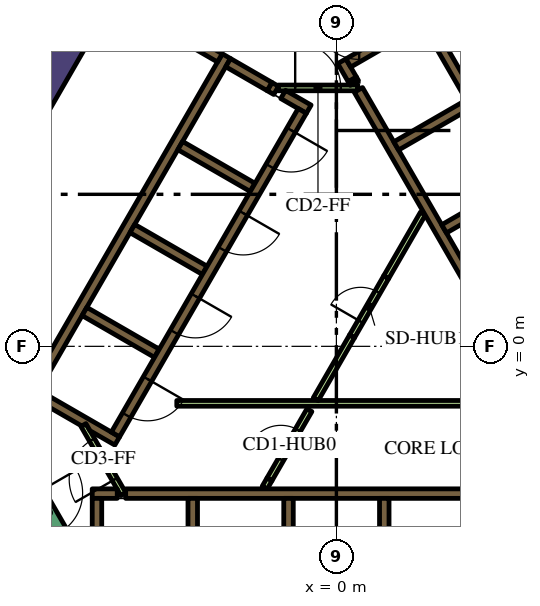
"""IFC4 building model, lengths in metres.
Left out: names, types, materials, properties, quantities, classifications, styles, units other than length and angle.
Written with IfcOpenShell. Run it as: python <this file> out.ifc"""

import sys

from ifc_helpers import new_model, si_unit, direction, frame, frame_2d, origin, place, context, subcontext, project, spatial, polyline, rectangle, outline, extrude, element, fill, save


model = new_model("IFC4")
c1 = context("Model", 3, precision=1e-05, world=origin(), true_north=direction((0.0, 1.0)))
c2 = subcontext(c1, "Body", "Model", "MODEL_VIEW")
j1 = project(units=[si_unit("LENGTHUNIT", "METRE"), si_unit("PLANEANGLEUNIT", "RADIAN")], contexts=[c1])
p1 = place(None, origin())
s1 = spatial("IfcSite", under=j1, at=p1, CompositionType="ELEMENT")
p2 = place(p1, origin())
s2 = spatial("IfcBuilding", under=s1, at=p2, CompositionType="ELEMENT")
p3 = place(p2, frame((0.0, 0.0, 171.0)))
s3 = spatial("IfcBuildingStorey", under=s2, at=p3, CompositionType="ELEMENT", Elevation=171.0)
p4 = place(p3, frame((8.279, 5.761, 0.0), z_axis=(0.0, 0.0, 1.0), x_axis=(-0.500010359015, 0.866019422922, 0.0)))
e1 = element("IfcWall", 1, at=p4, inside=s3, PredefinedType="SOLIDWALL", context=c2, shape_type="SweptSolid", body=[
    extrude(rectangle(XDim=12.528, YDim=0.8, at=frame_2d((6.264, 0.0))), origin(), (0.0, 0.0, 1.0), 4.2),
])
p5 = place(p3, frame((-12.668, -1.842, 0.0), z_axis=(0.0, 0.0, 1.0), x_axis=(0.500003640647, 0.866023301845, 0.0)))
e2 = element("IfcWall", 2, at=p5, inside=s3, PredefinedType="SOLIDWALL", context=c2, shape_type="SweptSolid", body=[
    extrude(rectangle(XDim=15.858, YDim=0.8, at=frame_2d((7.929, 0.0))), origin(), (0.0, 0.0, 1.0), 4.2),
])
p6 = place(p3, frame((-5.545, -3.875, 0.0), z_axis=(0.0, 0.0, 1.0), x_axis=(1.0, 0.0, 0.0)))
e3 = element("IfcWall", 3, at=p6, inside=s3, PredefinedType="SOLIDWALL", context=c2, shape_type="SweptSolid", body=[
    extrude(rectangle(XDim=11.97, YDim=0.25, at=frame_2d((5.985, 0.0))), origin(), (0.0, 0.0, 1.0), 4.2),
])
p7 = place(p3, frame((-6.425, -3.875, 0.0), z_axis=(0.0, 0.0, 1.0), x_axis=(1.0, 0.0, 0.0)))
e4 = element("IfcWall", 4, at=p7, inside=s3, PredefinedType="SOLIDWALL", context=c2, shape_type="SweptSolid", body=[
    extrude(rectangle(XDim=0.658, YDim=0.25, at=frame_2d((0.329, 0.0))), origin(), (0.0, 0.0, 1.0), 4.2),
])
for number, where, z_axis, x_axis in (
    (5, (1.26, -4.0, 0.0), (0.0, 0.0, 1.0), (0.0, -1.0, 0.0)),
    (6, (-1.26, -4.0, 0.0), (0.0, 0.0, 1.0), (0.0, -1.0, 0.0)),
    (7, (-3.78, -4.0, 0.0), (0.0, 0.0, 1.0), (0.0, -1.0, 0.0)),
):
    element("IfcWall", number, at=place(p3, frame(where, z_axis=z_axis, x_axis=x_axis)), inside=s3, PredefinedType="SOLIDWALL", context=c2, shape_type="SweptSolid", body=[
        extrude(rectangle(XDim=2.2, YDim=0.25, at=frame_2d((1.1, 0.0))), origin(), (0.0, 0.0, 1.0), 4.2),
    ])
p8 = place(p3, frame((-6.3, -7.125, 0.0), z_axis=(0.0, 0.0, 1.0), x_axis=(0.0, 1.0, 0.0)))
e8 = element("IfcWall", 8, at=p8, inside=s3, PredefinedType="SOLIDWALL", context=c2, shape_type="SweptSolid", body=[
    extrude(rectangle(XDim=3.125, YDim=0.25, at=frame_2d((1.562, 0.0))), origin(), (0.0, 0.0, 1.0), 4.2),
])
p9 = place(p3, frame((0.473, 6.93, 0.0), z_axis=(0.0, 0.0, 1.0), x_axis=(-0.49972245349, 0.866185586049, 0.0)))
e9 = element("IfcWall", 9, at=p9, inside=s3, PredefinedType="SOLIDWALL", context=c2, shape_type="SweptSolid", body=[
    extrude(rectangle(XDim=0.11, YDim=0.25, at=frame_2d((0.055, 0.0))), origin(), (0.0, 0.0, 1.0), 4.2),
])
p10 = place(p3, frame((6.568, -3.627, 0.0), z_axis=(0.0, 0.0, 1.0), x_axis=(-0.499999455981, 0.866025717874, 0.0)))
e10 = element("IfcWall", 10, at=p10, inside=s3, PredefinedType="SOLIDWALL", context=c2, shape_type="SweptSolid", body=[
    extrude(rectangle(XDim=11.978, YDim=0.25, at=frame_2d((5.989, 0.0))), origin(), (0.0, 0.0, 1.0), 4.2),
])
p11 = place(p3, frame((0.417, 7.027, 0.0), z_axis=(0.0, 0.0, 1.0), x_axis=(-0.500210807569, 0.865903659763, 0.0)))
e11 = element("IfcWall", 11, at=p11, inside=s3, PredefinedType="SOLIDWALL", context=c2, shape_type="SweptSolid", body=[
    extrude(rectangle(XDim=0.548, YDim=0.25, at=frame_2d((0.274, 0.0))), origin(), (0.0, 0.0, 1.0), 4.2),
])
p12 = place(p3, frame((3.1, 9.064, 0.0), z_axis=(0.0, 0.0, 1.0), x_axis=(-0.866030133475, -0.499991807846, 0.0)))
e12 = element("IfcWall", 12, at=p12, inside=s3, PredefinedType="SOLIDWALL", context=c2, shape_type="SweptSolid", body=[
    extrude(rectangle(XDim=3.217, YDim=0.25, at=frame_2d((1.608, 0.0))), origin(), (0.0, 0.0, 1.0), 4.2),
])
p13 = place(p3, frame((1.574, 5.274, 0.0), z_axis=(0.0, 0.0, 1.0), x_axis=(0.866028486751, 0.499994660107, 0.0)))
e13 = element("IfcWall", 13, at=p13, inside=s3, PredefinedType="SOLIDWALL", context=c2, shape_type="SweptSolid", body=[
    extrude(rectangle(XDim=2.2, YDim=0.25, at=frame_2d((1.1, 0.0))), origin(), (0.0, 0.0, 1.0), 4.2),
])
p14 = place(p3, frame((2.834, 3.091, 0.0), z_axis=(0.0, 0.0, 1.0), x_axis=(0.866008176907, 0.50002983664, 0.0)))
e14 = element("IfcWall", 14, at=p14, inside=s3, PredefinedType="SOLIDWALL", context=c2, shape_type="SweptSolid", body=[
    extrude(rectangle(XDim=2.2, YDim=0.25, at=frame_2d((1.1, 0.0))), origin(), (0.0, 0.0, 1.0), 4.2),
])
p15 = place(p3, frame((-8.06, -1.311, 0.0), z_axis=(0.0, 0.0, 1.0), x_axis=(0.50000273126, 0.866023826885, 0.0)))
e15 = element("IfcWall", 15, at=p15, inside=s3, PredefinedType="SOLIDWALL", context=c2, shape_type="SweptSolid", body=[
    extrude(rectangle(XDim=10.33, YDim=0.25, at=frame_2d((5.165, 0.0))), origin(), (0.0, 0.0, 1.0), 4.2),
])
p16 = place(p3, frame((-1.758, 6.835, 0.0), z_axis=(0.0, 0.0, 1.0), x_axis=(0.865982457891, -0.500074377092, 0.0)))
e16 = element("IfcWall", 16, at=p16, inside=s3, PredefinedType="SOLIDWALL", context=c2, shape_type="SweptSolid", body=[
    extrude(rectangle(XDim=0.2, YDim=0.25, at=frame_2d((0.1, 0.0))), origin(), (0.0, 0.0, 1.0), 4.2),
])
p17 = place(p3, frame((-1.76, 6.836, 0.0), z_axis=(0.0, 0.0, 1.0), x_axis=(-0.865952863304, 0.500125622755, 0.0)))
e17 = element("IfcWall", 17, at=p17, inside=s3, PredefinedType="SOLIDWALL", context=c2, shape_type="SweptSolid", body=[
    extrude(rectangle(XDim=1.258, YDim=0.25, at=frame_2d((0.629, 0.0))), origin(), (0.0, 0.0, 1.0), 4.2),
])
p18 = place(p3, frame((-0.728, 6.24, 0.0), z_axis=(0.0, 0.0, 1.0), x_axis=(-0.865955664968, 0.500120771724, 0.0)))
e18 = element("IfcWall", 18, at=p18, inside=s3, PredefinedType="SOLIDWALL", context=c2, shape_type="SweptSolid", body=[
    extrude(rectangle(XDim=0.778, YDim=0.25, at=frame_2d((0.389, 0.0))), origin(), (0.0, 0.0, 1.0), 4.2),
])
for number, where, z_axis, x_axis in (
    (19, (-2.204, 4.182, 0.0), (0.0, 0.0, 1.0), (-0.866, 0.5, 0.0)),
    (20, (-5.369, 3.1, 0.0), (0.0, 0.0, 1.0), (0.866, -0.5, 0.0)),
    (21, (-4.724, -0.182, 0.0), (0.0, 0.0, 1.0), (-0.866, 0.5, 0.0)),
):
    element("IfcWall", number, at=place(p3, frame(where, z_axis=z_axis, x_axis=x_axis)), inside=s3, PredefinedType="SOLIDWALL", context=c2, shape_type="SweptSolid", body=[
        extrude(rectangle(XDim=2.2, YDim=0.25, at=frame_2d((1.1, 0.0))), origin(), (0.0, 0.0, 1.0), 4.2),
    ])
p19 = place(p3, origin())
e22 = element("IfcWall", 22, at=p19, inside=s3, PredefinedType="SOLIDWALL", context=c2, shape_type="SweptSolid", body=[
    extrude(outline(polyline([(-5.922, -2.257), (-5.922, -2.257), (-5.705, -2.382), (-5.83, -2.598), (-6.483, -2.221), (-6.591, -2.033), (-6.591, -2.033), (-6.7, -2.096), (-7.952, -1.373), (-7.827, -1.156), (-5.922, -2.257)])), origin(), (0.0, 0.0, 1.0), 4.2),
])
p20 = place(p3, frame((-3.066, 7.59, 0.0), z_axis=(0.0, 0.0, 1.0), x_axis=(-0.866081358704, 0.49990307071, 0.0)))
e23 = element("IfcWall", 23, at=p20, inside=s3, PredefinedType="SOLIDWALL", context=c2, shape_type="SweptSolid", body=[
    extrude(rectangle(XDim=0.858, YDim=0.25, at=frame_2d((0.429, 0.0))), origin(), (0.0, 0.0, 1.0), 4.2),
])
p21 = place(p3, frame((-4.2, -1.5, 0.0), z_axis=(0.0, 0.0, 1.0), x_axis=(1.0, 0.0, 0.0)))
e24 = element("IfcWall", 24, at=p21, inside=s3, PredefinedType="PARTITIONING", context=c2, shape_type="SweptSolid", body=[
    extrude(rectangle(XDim=9.359, YDim=0.15, at=frame_2d((4.68, 0.0))), origin(), (0.0, 0.0, 1.0), 3.15),
])
p22 = place(p3, frame((-0.544, -1.393, 0.0), z_axis=(0.0, 0.0, 1.0), x_axis=(0.499928740635, 0.866066541489, 0.0)))
e25 = element("IfcWall", 25, at=p22, inside=s3, PredefinedType="PARTITIONING", context=c2, shape_type="SweptSolid", body=[
    extrude(rectangle(XDim=1.912, YDim=0.15, at=frame_2d((0.956, 0.0))), origin(), (0.0, 0.0, 1.0), 3.15),
])
p23 = place(p3, frame((1.312, 1.822, 0.0), z_axis=(0.0, 0.0, 1.0), x_axis=(0.500003549559, 0.866023354436, 0.0)))
e26 = element("IfcWall", 26, at=p23, inside=s3, PredefinedType="PARTITIONING", context=c2, shape_type="SweptSolid", body=[
    extrude(rectangle(XDim=1.93, YDim=0.15, at=frame_2d((0.965, 0.0))), origin(), (0.0, 0.0, 1.0), 3.15),
])
p24 = place(p3, frame((-1.887, -3.718, 0.0), z_axis=(0.0, 0.0, 1.0), x_axis=(0.500165633897, 0.865929753888, 0.0)))
e27 = element("IfcWall", 27, at=p24, inside=s3, PredefinedType="PARTITIONING", context=c2, shape_type="SweptSolid", body=[
    extrude(rectangle(XDim=0.254, YDim=0.15, at=frame_2d((0.127, 0.0))), origin(), (0.0, 0.0, 1.0), 3.15),
])
p25 = place(p3, frame((8.565, -2.185, 0.0), z_axis=(0.0, 0.0, 1.0), x_axis=(-0.499997954832, 0.866026584559, 0.0)))
e28 = element("IfcWall", 28, at=p25, inside=s3, PredefinedType="SOLIDWALL", context=c2, shape_type="SweptSolid", body=[
    extrude(rectangle(XDim=12.35, YDim=0.25, at=frame_2d((6.175, 0.0))), origin(), (0.0, 0.0, 1.0), 4.2),
])
p26 = place(p25, frame((0.585, 0.0, 0.0)))
e29 = element("IfcOpeningElement", 29, at=p26, cuts=e28, PredefinedType="OPENING", context=c2, shape_type="SweptSolid", body=[
    extrude(rectangle(XDim=1.1, YDim=2.1, at=frame_2d((0.55, 1.05))), frame((0.0, 0.135, 0.0), z_axis=(0.0, -1.0, 0.0), x_axis=(1.0, 0.0, 0.0)), (0.0, 0.0, 1.0), 0.27),
])
p27 = place(p3, frame((-0.898, 6.194, 0.0), z_axis=(0.0, 0.0, 1.0), x_axis=(-0.499996202215, -0.866027596426, 0.0)))
e30 = element("IfcWall", 30, at=p27, inside=s3, PredefinedType="SOLIDWALL", context=c2, shape_type="SweptSolid", body=[
    extrude(rectangle(XDim=9.83, YDim=0.25, at=frame_2d((4.915, 0.0))), origin(), (0.0, 0.0, 1.0), 4.2),
])
p28 = place(p27, frame((0.585, 0.0, 0.0)))
e31 = element("IfcOpeningElement", 31, at=p28, cuts=e30, PredefinedType="OPENING", context=c2, shape_type="SweptSolid", body=[
    extrude(rectangle(XDim=1.1, YDim=2.1, at=frame_2d((0.55, 1.05))), frame((0.0, 0.135, 0.0), z_axis=(0.0, -1.0, 0.0), x_axis=(1.0, 0.0, 0.0)), (0.0, 0.0, 1.0), 0.27),
])
p29 = place(p27, frame((3.105, 0.0, 0.0)))
e32 = element("IfcOpeningElement", 32, at=p29, cuts=e30, PredefinedType="OPENING", context=c2, shape_type="SweptSolid", body=[
    extrude(rectangle(XDim=1.1, YDim=2.1, at=frame_2d((0.55, 1.05))), frame((0.0, 0.135, 0.0), z_axis=(0.0, -1.0, 0.0), x_axis=(1.0, 0.0, 0.0)), (0.0, 0.0, 1.0), 0.27),
])
p30 = place(p27, frame((5.625, 0.0, 0.0)))
e33 = element("IfcOpeningElement", 33, at=p30, cuts=e30, PredefinedType="OPENING", context=c2, shape_type="SweptSolid", body=[
    extrude(rectangle(XDim=1.1, YDim=2.1, at=frame_2d((0.55, 1.05))), frame((0.0, 0.135, 0.0), z_axis=(0.0, -1.0, 0.0), x_axis=(1.0, 0.0, 0.0)), (0.0, 0.0, 1.0), 0.27),
])
p31 = place(p27, frame((8.145, 0.0, 0.0)))
e34 = element("IfcOpeningElement", 34, at=p31, cuts=e30, PredefinedType="OPENING", context=c2, shape_type="SweptSolid", body=[
    extrude(rectangle(XDim=1.1, YDim=2.1, at=frame_2d((0.55, 1.05))), frame((0.0, 0.135, 0.0), z_axis=(0.0, -1.0, 0.0), x_axis=(1.0, 0.0, 0.0)), (0.0, 0.0, 1.0), 0.27),
])
p32 = place(p3, frame((-8.103, -3.466, 0.0), z_axis=(0.0, 0.0, 1.0), x_axis=(0.500078061341, -0.865980330357, 0.0)))
e35 = element("IfcWall", 35, at=p32, inside=s3, PredefinedType="SOLIDWALL", context=c2, shape_type="SweptSolid", body=[
    extrude(rectangle(XDim=2.1, YDim=0.4, at=frame_2d((1.05, 0.0))), origin(), (0.0, 0.0, 1.0), 4.2),
])
p33 = place(p32, frame((0.45, 0.0, 0.0)))
e36 = element("IfcOpeningElement", 36, at=p33, cuts=e35, PredefinedType="OPENING", context=c2, shape_type="SweptSolid", body=[
    extrude(rectangle(XDim=1.2, YDim=2.1, at=frame_2d((0.6, 1.05))), frame((0.0, 0.21, 0.0), z_axis=(0.0, -1.0, 0.0), x_axis=(1.0, 0.0, 0.0)), (0.0, 0.0, 1.0), 0.42),
])
p34 = place(p3, frame((-1.76, -3.498, 0.0), z_axis=(0.0, 0.0, 1.0), x_axis=(0.499977374825, 0.866038466041, 0.0)))
e37 = element("IfcWall", 37, at=p34, inside=s3, PredefinedType="PARTITIONING", context=c2, shape_type="SweptSolid", body=[
    extrude(rectangle(XDim=2.1, YDim=0.15, at=frame_2d((1.05, 0.0))), origin(), (0.0, 0.0, 1.0), 3.15),
])
p35 = place(p34, frame((0.6, 0.0, 0.0)))
e38 = element("IfcOpeningElement", 38, at=p35, cuts=e37, PredefinedType="OPENING", context=c2, shape_type="SweptSolid", body=[
    extrude(rectangle(XDim=0.9, YDim=2.1, at=frame_2d((0.45, 1.05))), frame((0.0, 0.085, 0.0), z_axis=(0.0, -1.0, 0.0), x_axis=(1.0, 0.0, 0.0)), (0.0, 0.0, 1.0), 0.17),
])
p36 = place(p3, frame((-1.534, 6.8, 0.0), z_axis=(0.0, 0.0, 1.0), x_axis=(1.0, 0.0, 0.0)))
e39 = element("IfcWall", 39, at=p36, inside=s3, PredefinedType="PARTITIONING", context=c2, shape_type="SweptSolid", body=[
    extrude(rectangle(XDim=2.1, YDim=0.15, at=frame_2d((1.05, 0.0))), origin(), (0.0, 0.0, 1.0), 3.15),
])
p37 = place(p36, frame((0.45, 0.0, 0.0)))
e40 = element("IfcOpeningElement", 40, at=p37, cuts=e39, PredefinedType="OPENING", context=c2, shape_type="SweptSolid", body=[
    extrude(rectangle(XDim=1.2, YDim=2.1, at=frame_2d((0.6, 1.05))), frame((0.0, 0.085, 0.0), z_axis=(0.0, -1.0, 0.0), x_axis=(1.0, 0.0, 0.0)), (0.0, 0.0, 1.0), 0.17),
])
p38 = place(p3, frame((-5.606, -3.89, 0.0), z_axis=(0.0, 0.0, 1.0), x_axis=(-0.500027713859, 0.866009402589, 0.0)))
e41 = element("IfcWall", 41, at=p38, inside=s3, PredefinedType="PARTITIONING", context=c2, shape_type="SweptSolid", body=[
    extrude(rectangle(XDim=2.1, YDim=0.15, at=frame_2d((1.05, 0.0))), origin(), (0.0, 0.0, 1.0), 3.15),
])
p39 = place(p38, frame((0.45, 0.0, 0.0)))
e42 = element("IfcOpeningElement", 42, at=p39, cuts=e41, PredefinedType="OPENING", context=c2, shape_type="SweptSolid", body=[
    extrude(rectangle(XDim=1.2, YDim=2.1, at=frame_2d((0.6, 1.05))), frame((0.0, 0.085, 0.0), z_axis=(0.0, -1.0, 0.0), x_axis=(1.0, 0.0, 0.0)), (0.0, 0.0, 1.0), 0.17),
])
p40 = place(p3, frame((0.412, 0.263, 0.0), z_axis=(0.0, 0.0, 1.0), x_axis=(0.500062916607, 0.865989075817, 0.0)))
e43 = element("IfcWall", 43, at=p40, inside=s3, PredefinedType="PARTITIONING", context=c2, shape_type="SweptSolid", body=[
    extrude(rectangle(XDim=1.8, YDim=0.15, at=frame_2d((0.9, 0.0))), origin(), (0.0, 0.0, 1.0), 3.15),
])
p41 = place(p40, frame((0.45, 0.0, 0.0)))
e44 = element("IfcOpeningElement", 44, at=p41, cuts=e43, PredefinedType="OPENING", context=c2, shape_type="SweptSolid", body=[
    extrude(rectangle(XDim=0.9, YDim=2.1, at=frame_2d((0.45, 1.05))), frame((0.0, 0.085, 0.0), z_axis=(0.0, -1.0, 0.0), x_axis=(1.0, 0.0, 0.0)), (0.0, 0.0, 1.0), 0.17),
])
p42 = place(p28, origin())
e45 = element("IfcDoor", 45, at=p42, inside=s3, OperationType="DOUBLE_DOOR_SLIDING", PredefinedType="DOOR", context=c2, shape_type="SweptSolid", body=[
    extrude(rectangle(XDim=1.1, YDim=2.1, at=frame_2d((0.55, 1.05))), frame((0.0, 0.025, 0.0), z_axis=(0.0, -1.0, 0.0), x_axis=(1.0, 0.0, 0.0)), (0.0, 0.0, 1.0), 0.05),
])
fill(e31, e45)
p43 = place(p29, origin())
e46 = element("IfcDoor", 46, at=p43, inside=s3, OperationType="DOUBLE_DOOR_SLIDING", PredefinedType="DOOR", context=c2, shape_type="SweptSolid", body=[
    extrude(rectangle(XDim=1.1, YDim=2.1, at=frame_2d((0.55, 1.05))), frame((0.0, 0.025, 0.0), z_axis=(0.0, -1.0, 0.0), x_axis=(1.0, 0.0, 0.0)), (0.0, 0.0, 1.0), 0.05),
])
fill(e32, e46)
p44 = place(p30, origin())
e47 = element("IfcDoor", 47, at=p44, inside=s3, OperationType="DOUBLE_DOOR_SLIDING", PredefinedType="DOOR", context=c2, shape_type="SweptSolid", body=[
    extrude(rectangle(XDim=1.1, YDim=2.1, at=frame_2d((0.55, 1.05))), frame((0.0, 0.025, 0.0), z_axis=(0.0, -1.0, 0.0), x_axis=(1.0, 0.0, 0.0)), (0.0, 0.0, 1.0), 0.05),
])
fill(e33, e47)
p45 = place(p31, origin())
e48 = element("IfcDoor", 48, at=p45, inside=s3, OperationType="DOUBLE_DOOR_SLIDING", PredefinedType="DOOR", context=c2, shape_type="SweptSolid", body=[
    extrude(rectangle(XDim=1.1, YDim=2.1, at=frame_2d((0.55, 1.05))), frame((0.0, 0.025, 0.0), z_axis=(0.0, -1.0, 0.0), x_axis=(1.0, 0.0, 0.0)), (0.0, 0.0, 1.0), 0.05),
])
fill(e34, e48)
p46 = place(p33, origin())
e49 = element("IfcDoor", 49, at=p46, inside=s3, OperationType="SINGLE_SWING_LEFT", PredefinedType="DOOR", context=c2, shape_type="SweptSolid", body=[
    extrude(rectangle(XDim=1.2, YDim=2.1, at=frame_2d((0.6, 1.05))), frame((0.0, 0.025, 0.0), z_axis=(0.0, -1.0, 0.0), x_axis=(1.0, 0.0, 0.0)), (0.0, 0.0, 1.0), 0.05),
])
fill(e36, e49)
p47 = place(p35, origin())
e50 = element("IfcDoor", 50, at=p47, inside=s3, OperationType="SINGLE_SWING_LEFT", PredefinedType="DOOR", context=c2, shape_type="SweptSolid", body=[
    extrude(rectangle(XDim=0.9, YDim=2.1, at=frame_2d((0.45, 1.05))), frame((0.0, 0.025, 0.0), z_axis=(0.0, -1.0, 0.0), x_axis=(1.0, 0.0, 0.0)), (0.0, 0.0, 1.0), 0.05),
])
fill(e38, e50)
p48 = place(p37, origin())
e51 = element("IfcDoor", 51, at=p48, inside=s3, OperationType="SINGLE_SWING_LEFT", PredefinedType="DOOR", context=c2, shape_type="SweptSolid", body=[
    extrude(rectangle(XDim=1.2, YDim=2.1, at=frame_2d((0.6, 1.05))), frame((0.0, 0.025, 0.0), z_axis=(0.0, -1.0, 0.0), x_axis=(1.0, 0.0, 0.0)), (0.0, 0.0, 1.0), 0.05),
])
fill(e40, e51)
p49 = place(p39, origin())
e52 = element("IfcDoor", 52, at=p49, inside=s3, OperationType="SINGLE_SWING_LEFT", PredefinedType="DOOR", context=c2, shape_type="SweptSolid", body=[
    extrude(rectangle(XDim=1.2, YDim=2.1, at=frame_2d((0.6, 1.05))), frame((0.0, 0.025, 0.0), z_axis=(0.0, -1.0, 0.0), x_axis=(1.0, 0.0, 0.0)), (0.0, 0.0, 1.0), 0.05),
])
fill(e42, e52)
p50 = place(p41, origin())
e53 = element("IfcDoor", 53, at=p50, inside=s3, OperationType="SINGLE_SWING_LEFT", PredefinedType="DOOR", context=c2, shape_type="SweptSolid", body=[
    extrude(rectangle(XDim=0.9, YDim=2.1, at=frame_2d((0.45, 1.05))), frame((0.0, 0.025, 0.0), z_axis=(0.0, -1.0, 0.0), x_axis=(1.0, 0.0, 0.0)), (0.0, 0.0, 1.0), 0.05),
])
fill(e44, e53)
save(model, sys.argv[1])
